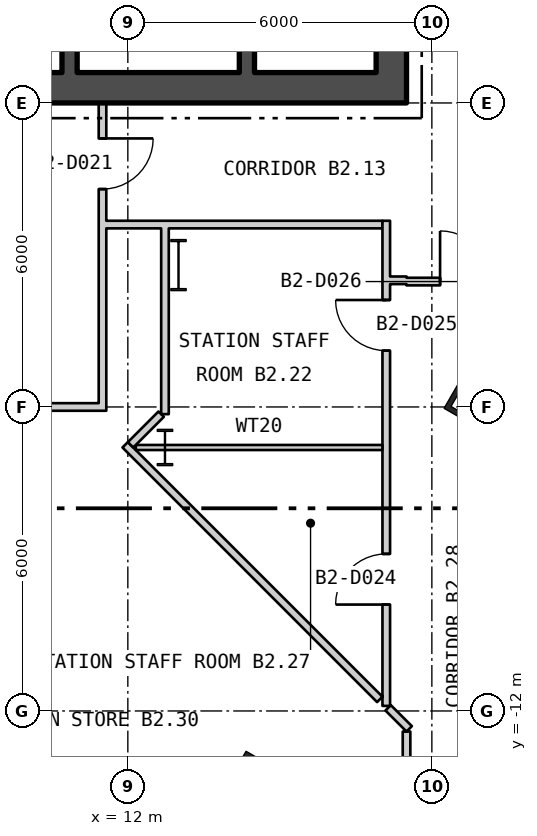
"""IFC4 building model, lengths in metres.
Left out: names, types, materials, properties, quantities, classifications, styles, units other than length and angle.
Written with IfcOpenShell. Run it as: python <this file> out.ifc"""

import sys

from ifc_helpers import new_model, si_unit, direction, frame, frame_2d, origin, origin_2d, place, context, subcontext, project, spatial, rectangle, hollow_rectangle, i_section, extrude, element, fill, save


model = new_model("IFC4")
c1 = context("Model", 3, precision=1e-05, world=origin(), true_north=direction((0.0, 1.0)))
c2 = subcontext(c1, "Body", "Model", "MODEL_VIEW")
j1 = project(units=[si_unit("LENGTHUNIT", "METRE"), si_unit("PLANEANGLEUNIT", "RADIAN")], contexts=[c1])
p1 = place(None, origin())
s1 = spatial("IfcSite", under=j1, at=p1, CompositionType="ELEMENT")
p2 = place(p1, origin())
s2 = spatial("IfcBuilding", under=s1, at=p2, CompositionType="ELEMENT")
p3 = place(p2, frame((0.0, 0.0, -11.4)))
s3 = spatial("IfcBuildingStorey", under=s2, at=p3, CompositionType="ELEMENT", Elevation=-11.4)
for number, where, z_axis, x_axis in (
    (1, (14.553, -13.615, 0.0), (0.0, 0.0, 1.0), (0.5, 0.866, 0.0)),
    (2, (19.061, -5.807, 0.0), (0.0, 0.0, 1.0), (0.5, 0.866, 0.0)),
):
    element("IfcColumn", number, at=place(p3, frame(where, z_axis=z_axis, x_axis=x_axis)), inside=s3, PredefinedType="COLUMN", context=c2, shape_type="SweptSolid", body=[
        extrude(hollow_rectangle(XDim=1.2, YDim=1.2, WallThickness=0.1, at=origin_2d()), origin(), (0.0, 0.0, 1.0), 5.7),
    ])
p4 = place(p3, frame((13.0, -3.2, 0.0), z_axis=(0.0, 0.0, 1.0), x_axis=(1.0, 0.0, 0.0)))
e3 = element("IfcColumn", 3, at=p4, inside=s3, PredefinedType="COLUMN", context=c2, shape_type="SweptSolid", body=[
    extrude(i_section(OverallWidth=0.302, OverallDepth=1.008, WebThickness=0.021, FlangeThickness=0.04, at=origin_2d()), origin(), (0.0, 0.0, 1.0), 5.7),
])
p5 = place(p3, frame((12.733, -6.8, 0.0), z_axis=(0.0, 0.0, 1.0), x_axis=(1.0, 0.0, 0.0)))
e4 = element("IfcColumn", 4, at=p5, inside=s3, PredefinedType="COLUMN", context=c2, shape_type="SweptSolid", body=[
    extrude(i_section(OverallWidth=0.304, OverallDepth=0.716, WebThickness=0.021, FlangeThickness=0.04, at=origin_2d()), origin(), (0.0, 0.0, 1.0), 5.7),
])
p6 = place(p3, frame((-17.5, 0.3, 0.0), z_axis=(0.0, 0.0, 1.0), x_axis=(1.0, 0.0, 0.0)))
e5 = element("IfcWall", 5, at=p6, inside=s3, PredefinedType="SHEAR", context=c2, shape_type="SweptSolid", body=[
    extrude(rectangle(XDim=35.0, YDim=0.6, at=frame_2d((17.5, 0.0))), origin(), (0.0, 0.0, 1.0), 5.25),
])
p7 = place(p6, frame((12.0, 0.0, 0.0)))
e6 = element("IfcOpeningElement", 6, at=p7, cuts=e5, PredefinedType="OPENING", context=c2, shape_type="SweptSolid", body=[
    extrude(rectangle(XDim=1.8, YDim=2.4, at=frame_2d((0.9, 1.2))), frame((0.0, 0.31, 0.0), z_axis=(0.0, -1.0, 0.0), x_axis=(1.0, 0.0, 0.0)), (0.0, 0.0, 1.0), 0.62),
])
p8 = place(p6, frame((22.0, 0.0, 0.0)))
e7 = element("IfcOpeningElement", 7, at=p8, cuts=e5, PredefinedType="OPENING", context=c2, shape_type="SweptSolid", body=[
    extrude(rectangle(XDim=1.8, YDim=2.4, at=frame_2d((0.9, 1.2))), frame((0.0, 0.31, 0.0), z_axis=(0.0, -1.0, 0.0), x_axis=(1.0, 0.0, 0.0)), (0.0, 0.0, 1.0), 0.62),
])
p9 = place(p3, frame((17.2, 0.6, 0.0), z_axis=(0.0, 0.0, 1.0), x_axis=(0.0, 1.0, 0.0)))
e8 = element("IfcWall", 8, at=p9, inside=s3, PredefinedType="SHEAR", context=c2, shape_type="SweptSolid", body=[
    extrude(rectangle(XDim=16.8, YDim=0.6, at=frame_2d((8.4, 0.0))), origin(), (0.0, 0.0, 1.0), 5.25),
])
p10 = place(p9, frame((5.7, 0.0, 0.0)))
e9 = element("IfcOpeningElement", 9, at=p10, cuts=e8, PredefinedType="OPENING", context=c2, shape_type="SweptSolid", body=[
    extrude(rectangle(XDim=1.5, YDim=2.1, at=frame_2d((0.75, 1.05))), frame((0.0, 0.31, 0.0), z_axis=(0.0, -1.0, 0.0), x_axis=(1.0, 0.0, 0.0)), (0.0, 0.0, 1.0), 0.62),
])
p11 = place(p9, frame((1.5, 0.0, 0.0)))
e10 = element("IfcOpeningElement", 10, at=p11, cuts=e8, PredefinedType="OPENING", context=c2, shape_type="SweptSolid", body=[
    extrude(rectangle(XDim=0.9, YDim=2.1, at=frame_2d((0.45, 1.05))), frame((0.0, 0.31, 0.0), z_axis=(0.0, -1.0, 0.0), x_axis=(1.0, 0.0, 0.0)), (0.0, 0.0, 1.0), 0.62),
])
p12 = place(p9, frame((4.35, 0.0, 0.0)))
e11 = element("IfcOpeningElement", 11, at=p12, cuts=e8, PredefinedType="OPENING", context=c2, shape_type="SweptSolid", body=[
    extrude(rectangle(XDim=0.9, YDim=2.1, at=frame_2d((0.45, 1.05))), frame((0.0, 0.31, 0.0), z_axis=(0.0, -1.0, 0.0), x_axis=(1.0, 0.0, 0.0)), (0.0, 0.0, 1.0), 0.62),
])
p13 = place(p9, frame((7.996, 0.0, 0.0)))
e12 = element("IfcOpeningElement", 12, at=p13, cuts=e8, PredefinedType="OPENING", context=c2, shape_type="SweptSolid", body=[
    extrude(rectangle(XDim=1.0, YDim=2.1, at=frame_2d((0.5, 1.05))), frame((0.0, 0.31, 0.0), z_axis=(0.0, -1.0, 0.0), x_axis=(1.0, 0.0, 0.0)), (0.0, 0.0, 1.0), 0.62),
])
p14 = place(p9, frame((12.846, 0.0, 0.0)))
e13 = element("IfcOpeningElement", 13, at=p14, cuts=e8, PredefinedType="OPENING", context=c2, shape_type="SweptSolid", body=[
    extrude(rectangle(XDim=0.9, YDim=2.1, at=frame_2d((0.45, 1.05))), frame((0.0, 0.31, 0.0), z_axis=(0.0, -1.0, 0.0), x_axis=(1.0, 0.0, 0.0)), (0.0, 0.0, 1.0), 0.62),
])
p15 = place(p3, frame((10.85, 0.6, 0.0), z_axis=(0.0, 0.0, 1.0), x_axis=(0.0, 1.0, 0.0)))
e14 = element("IfcWall", 14, at=p15, inside=s3, PredefinedType="SHEAR", context=c2, shape_type="SweptSolid", body=[
    extrude(rectangle(XDim=16.8, YDim=0.3, at=frame_2d((8.4, 0.0))), origin(), (0.0, 0.0, 1.0), 5.25),
])
p16 = place(p15, frame((5.075, 0.0, 0.0)))
e15 = element("IfcOpeningElement", 15, at=p16, cuts=e14, PredefinedType="OPENING", context=c2, shape_type="SweptSolid", body=[
    extrude(rectangle(XDim=1.25, YDim=2.1, at=frame_2d((0.625, 1.05))), frame((0.0, 0.16, 0.0), z_axis=(0.0, -1.0, 0.0), x_axis=(1.0, 0.0, 0.0)), (0.0, 0.0, 1.0), 0.32),
])
p17 = place(p15, frame((1.525, 0.0, 0.0)))
e16 = element("IfcOpeningElement", 16, at=p17, cuts=e14, PredefinedType="OPENING", context=c2, shape_type="SweptSolid", body=[
    extrude(rectangle(XDim=1.0, YDim=2.1, at=frame_2d((0.5, 1.05))), frame((0.0, 0.16, 0.0), z_axis=(0.0, -1.0, 0.0), x_axis=(1.0, 0.0, 0.0)), (0.0, 0.0, 1.0), 0.32),
])
p18 = place(p3, frame((14.35, 0.6, 0.0), z_axis=(0.0, 0.0, 1.0), x_axis=(0.0, 1.0, 0.0)))
e17 = element("IfcWall", 17, at=p18, inside=s3, PredefinedType="SHEAR", context=c2, shape_type="SweptSolid", body=[
    extrude(rectangle(XDim=16.8, YDim=0.3, at=frame_2d((8.4, 0.0))), origin(), (0.0, 0.0, 1.0), 5.25),
])
p19 = place(p18, frame((5.7, 0.0, 0.0)))
e18 = element("IfcOpeningElement", 18, at=p19, cuts=e17, PredefinedType="OPENING", context=c2, shape_type="SweptSolid", body=[
    extrude(rectangle(XDim=1.5, YDim=2.1, at=frame_2d((0.75, 1.05))), frame((0.0, 0.16, 0.0), z_axis=(0.0, -1.0, 0.0), x_axis=(1.0, 0.0, 0.0)), (0.0, 0.0, 1.0), 0.32),
])
p20 = place(p3, frame((9.125, -6.0, 0.0), z_axis=(0.0, 0.0, 1.0), x_axis=(1.0, 0.0, 0.0)))
e19 = element("IfcWall", 19, at=p20, inside=s3, PredefinedType="PARTITIONING", context=c2, shape_type="SweptSolid", body=[
    extrude(rectangle(XDim=2.3, YDim=0.15, at=frame_2d((1.15, 0.0))), origin(), (0.0, 0.0, 1.0), 5.25),
])
p21 = place(p3, frame((11.5, -6.075, 0.0), z_axis=(0.0, 0.0, 1.0), x_axis=(0.0, 1.0, 0.0)))
e20 = element("IfcWall", 20, at=p21, inside=s3, PredefinedType="PARTITIONING", context=c2, shape_type="SweptSolid", body=[
    extrude(rectangle(XDim=6.075, YDim=0.15, at=frame_2d((3.038, 0.0))), origin(), (0.0, 0.0, 1.0), 5.25),
])
p22 = place(p21, frame((4.375, 0.0, 0.0)))
e21 = element("IfcOpeningElement", 21, at=p22, cuts=e20, PredefinedType="OPENING", context=c2, shape_type="SweptSolid", body=[
    extrude(rectangle(XDim=1.0, YDim=2.1, at=frame_2d((0.5, 1.05))), frame((0.0, 0.085, 0.0), z_axis=(0.0, -1.0, 0.0), x_axis=(1.0, 0.0, 0.0)), (0.0, 0.0, 1.0), 0.17),
])
p23 = place(p3, frame((11.575, -2.4, 0.0), z_axis=(0.0, 0.0, 1.0), x_axis=(1.0, 0.0, 0.0)))
e22 = element("IfcWall", 22, at=p23, inside=s3, PredefinedType="PARTITIONING", context=c2, shape_type="SweptSolid", body=[
    extrude(rectangle(XDim=5.45, YDim=0.15, at=frame_2d((2.725, 0.0))), origin(), (0.0, 0.0, 1.0), 5.25),
])
p24 = place(p3, frame((11.947, -6.747, 0.0), z_axis=(0.0, 0.0, 1.0), x_axis=(0.707106781187, -0.707106781187, 0.0)))
e23 = element("IfcWall", 23, at=p24, inside=s3, PredefinedType="PARTITIONING", context=c2, shape_type="SweptSolid", body=[
    extrude(rectangle(XDim=7.106, YDim=0.15, at=frame_2d((3.553, 0.0))), origin(), (0.0, 0.0, 1.0), 5.25),
])
p25 = place(p3, frame((12.054, -6.747, 0.0), z_axis=(0.0, 0.0, 1.0), x_axis=(0.706521670373, 0.707691408238, 0.0)))
e24 = element("IfcWall", 24, at=p25, inside=s3, PredefinedType="PARTITIONING", context=c2, shape_type="SweptSolid", body=[
    extrude(rectangle(XDim=0.855, YDim=0.15, at=frame_2d((0.427, 0.0))), origin(), (0.0, 0.0, 1.0), 5.25),
])
p26 = place(p3, frame((12.157, -6.8, 0.0), z_axis=(0.0, 0.0, 1.0), x_axis=(1.0, 0.0, 0.0)))
e25 = element("IfcWall", 25, at=p26, inside=s3, PredefinedType="PARTITIONING", context=c2, shape_type="SweptSolid", body=[
    extrude(rectangle(XDim=4.868, YDim=0.1, at=frame_2d((2.434, 0.0))), origin(), (0.0, 0.0, 1.0), 5.25),
])
p27 = place(p3, frame((12.733, -6.142, 0.0), z_axis=(0.0, 0.0, 1.0), x_axis=(0.0, 1.0, 0.0)))
e26 = element("IfcWall", 26, at=p27, inside=s3, PredefinedType="PARTITIONING", context=c2, shape_type="SweptSolid", body=[
    extrude(rectangle(XDim=3.667, YDim=0.15, at=frame_2d((1.833, 0.0))), origin(), (0.0, 0.0, 1.0), 5.25),
])
p28 = place(p3, frame((17.1, -11.9, 0.0), z_axis=(0.0, 0.0, 1.0), x_axis=(0.0, 1.0, 0.0)))
e27 = element("IfcWall", 27, at=p28, inside=s3, PredefinedType="PARTITIONING", context=c2, shape_type="SweptSolid", body=[
    extrude(rectangle(XDim=9.575, YDim=0.15, at=frame_2d((4.787, 0.0))), origin(), (0.0, 0.0, 1.0), 5.25),
])
p29 = place(p28, frame((2.0, 0.0, 0.0)))
e28 = element("IfcOpeningElement", 28, at=p29, cuts=e27, PredefinedType="OPENING", context=c2, shape_type="SweptSolid", body=[
    extrude(rectangle(XDim=1.0, YDim=2.1, at=frame_2d((0.5, 1.05))), frame((0.0, 0.085, 0.0), z_axis=(0.0, -1.0, 0.0), x_axis=(1.0, 0.0, 0.0)), (0.0, 0.0, 1.0), 0.17),
])
p30 = place(p28, frame((7.011, 0.0, 0.0)))
e29 = element("IfcOpeningElement", 29, at=p30, cuts=e27, PredefinedType="OPENING", context=c2, shape_type="SweptSolid", body=[
    extrude(rectangle(XDim=1.0, YDim=2.1, at=frame_2d((0.5, 1.05))), frame((0.0, 0.085, 0.0), z_axis=(0.0, -1.0, 0.0), x_axis=(1.0, 0.0, 0.0)), (0.0, 0.0, 1.0), 0.17),
])
p31 = place(p3, frame((17.137, -11.938, 0.0), z_axis=(0.0, 0.0, 1.0), x_axis=(0.707957179278, -0.706255359136, 0.0)))
e30 = element("IfcWall", 30, at=p31, inside=s3, PredefinedType="PARTITIONING", context=c2, shape_type="SweptSolid", body=[
    extrude(rectangle(XDim=0.588, YDim=0.15, at=frame_2d((0.294, 0.0))), origin(), (0.0, 0.0, 1.0), 5.25),
])
p32 = place(p3, frame((17.175, -3.5, 0.0), z_axis=(0.0, 0.0, 1.0), x_axis=(1.0, 0.0, 0.0)))
e31 = element("IfcWall", 31, at=p32, inside=s3, PredefinedType="PARTITIONING", context=c2, shape_type="SweptSolid", body=[
    extrude(rectangle(XDim=0.325, YDim=0.15, at=frame_2d((0.163, 0.0))), origin(), (0.0, 0.0, 1.0), 5.25),
])
p33 = place(p3, frame((17.5, -19.963, 0.0), z_axis=(0.0, 0.0, 1.0), x_axis=(0.0, 1.0, 0.0)))
e32 = element("IfcWall", 32, at=p33, inside=s3, PredefinedType="PARTITIONING", context=c2, shape_type="SweptSolid", body=[
    extrude(rectangle(XDim=7.557, YDim=0.15, at=frame_2d((3.779, 0.0))), origin(), (0.0, 0.0, 1.0), 5.25),
])
p34 = place(p3, frame((17.5, -3.525, 0.0), z_axis=(0.0, 0.0, 1.0), x_axis=(1.0, 0.0, 0.0)))
e33 = element("IfcWall", 33, at=p34, inside=s3, PredefinedType="PARTITIONING", context=c2, shape_type="SweptSolid", body=[
    extrude(rectangle(XDim=2.325, YDim=0.15, at=frame_2d((1.163, 0.0))), origin(), (0.0, 0.0, 1.0), 5.25),
])
p35 = place(p34, frame((0.662, 0.0, 0.0)))
e34 = element("IfcOpeningElement", 34, at=p35, cuts=e33, PredefinedType="OPENING", context=c2, shape_type="SweptSolid", body=[
    extrude(rectangle(XDim=1.0, YDim=2.1, at=frame_2d((0.5, 1.05))), frame((0.0, 0.085, 0.0), z_axis=(0.0, -1.0, 0.0), x_axis=(1.0, 0.0, 0.0)), (0.0, 0.0, 1.0), 0.17),
])
p36 = place(p22, origin())
e35 = element("IfcDoor", 35, at=p36, inside=s3, OperationType="SINGLE_SWING_RIGHT", PredefinedType="DOOR", context=c2, shape_type="SweptSolid", body=[
    extrude(rectangle(XDim=1.0, YDim=2.1, at=frame_2d((0.5, 1.05))), frame((0.0, 0.025, 0.0), z_axis=(0.0, -1.0, 0.0), x_axis=(1.0, 0.0, 0.0)), (0.0, 0.0, 1.0), 0.05),
])
fill(e21, e35)
p37 = place(p29, origin())
e36 = element("IfcDoor", 36, at=p37, inside=s3, OperationType="SINGLE_SWING_RIGHT", PredefinedType="DOOR", context=c2, shape_type="SweptSolid", body=[
    extrude(rectangle(XDim=1.0, YDim=2.1, at=frame_2d((0.5, 1.05))), frame((0.0, 0.025, 0.0), z_axis=(0.0, -1.0, 0.0), x_axis=(1.0, 0.0, 0.0)), (0.0, 0.0, 1.0), 0.05),
])
fill(e28, e36)
p38 = place(p30, origin())
e37 = element("IfcDoor", 37, at=p38, inside=s3, OperationType="SINGLE_SWING_LEFT", PredefinedType="DOOR", context=c2, shape_type="SweptSolid", body=[
    extrude(rectangle(XDim=1.0, YDim=2.1, at=frame_2d((0.5, 1.05))), frame((0.0, 0.025, 0.0), z_axis=(0.0, -1.0, 0.0), x_axis=(1.0, 0.0, 0.0)), (0.0, 0.0, 1.0), 0.05),
])
fill(e29, e37)
p39 = place(p35, origin())
e38 = element("IfcDoor", 38, at=p39, inside=s3, OperationType="SINGLE_SWING_RIGHT", PredefinedType="DOOR", context=c2, shape_type="SweptSolid", body=[
    extrude(rectangle(XDim=1.0, YDim=2.1, at=frame_2d((0.5, 1.05))), frame((0.0, 0.025, 0.0), z_axis=(0.0, -1.0, 0.0), x_axis=(1.0, 0.0, 0.0)), (0.0, 0.0, 1.0), 0.05),
])
fill(e34, e38)
save(model, sys.argv[1])
